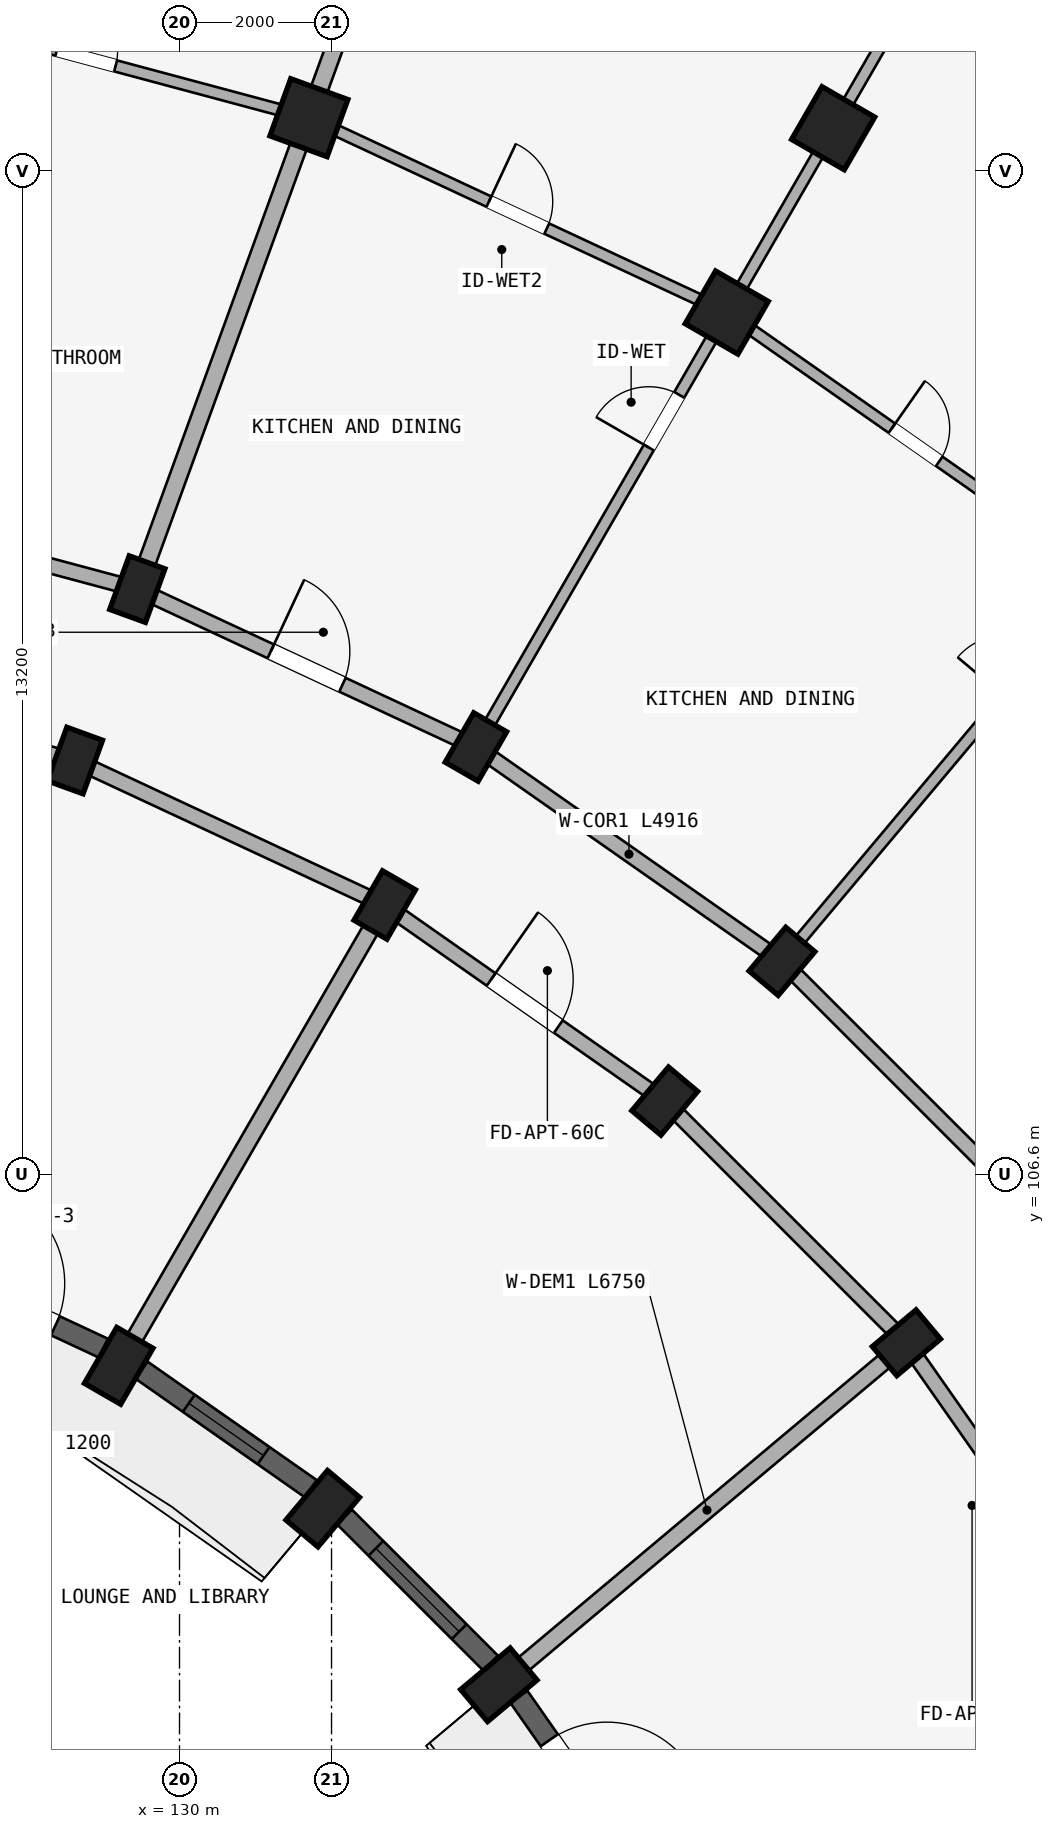
"""IFC4 building model, lengths in metres.
Left out: names, types, materials, properties, quantities, classifications, styles, units other than length and angle.
Written with IfcOpenShell. Run it as: python <this file> out.ifc"""

import sys

from ifc_helpers import new_model, si_unit, direction, frame, frame_2d, origin, origin_2d, place, context, subcontext, project, spatial, rectangle, extrude, element, fill, save


model = new_model("IFC4")
c1 = context("Model", 3, precision=1e-05, world=origin(), true_north=direction((0.0, 1.0)))
c2 = subcontext(c1, "Body", "Model", "MODEL_VIEW")
j1 = project(units=[si_unit("LENGTHUNIT", "METRE"), si_unit("PLANEANGLEUNIT", "RADIAN")], contexts=[c1])
p1 = place(None, origin())
s1 = spatial("IfcSite", under=j1, at=p1, CompositionType="ELEMENT")
p2 = place(p1, origin())
s2 = spatial("IfcBuilding", under=s1, at=p2, CompositionType="ELEMENT")
p3 = place(p2, frame((0.0, 0.0, 8.7)))
s3 = spatial("IfcBuildingStorey", under=s2, at=p3, CompositionType="ELEMENT", Elevation=8.7)
for number, where, z_axis, x_axis in (
    (1, (128.624, 112.044, 0.0), (0.0, 0.0, 1.0), (-0.94, 0.342, 0.0)),
    (2, (129.445, 114.299, 0.0), (0.0, 0.0, 1.0), (-0.94, 0.342, 0.0)),
):
    element("IfcColumn", number, at=place(p3, frame(where, z_axis=z_axis, x_axis=x_axis)), inside=s3, PredefinedType="COLUMN", context=c2, shape_type="SweptSolid", body=[
        extrude(rectangle(XDim=0.5, YDim=0.75, at=origin_2d()), origin(), (0.0, 0.0, 1.0), 2.93),
    ])
p4 = place(p3, frame((131.702, 120.501, 0.0), z_axis=(0.0, 0.0, 1.0), x_axis=(-0.939692620786, 0.342020143326, 0.0)))
e3 = element("IfcColumn", 3, at=p4, inside=s3, PredefinedType="COLUMN", context=c2, shape_type="SweptSolid", body=[
    extrude(rectangle(XDim=0.8, YDim=0.8, at=origin_2d()), origin(), (0.0, 0.0, 1.0), 2.93),
])
p5 = place(p3, frame((129.2, 104.081, 0.0), z_axis=(0.0, 0.0, 1.0), x_axis=(-0.866025403784, 0.5, 0.0)))
e4 = element("IfcColumn", 4, at=p5, inside=s3, PredefinedType="COLUMN", context=c2, shape_type="SweptSolid", body=[
    extrude(rectangle(XDim=0.55, YDim=0.85, at=origin_2d()), origin(), (0.0, 0.0, 1.0), 2.93),
])
for number, where, z_axis, x_axis in (
    (5, (132.7, 110.144, 0.0), (0.0, 0.0, 1.0), (-0.866, 0.5, 0.0)),
    (6, (133.9, 112.222, 0.0), (0.0, 0.0, 1.0), (-0.866, 0.5, 0.0)),
):
    element("IfcColumn", number, at=place(p3, frame(where, z_axis=z_axis, x_axis=x_axis)), inside=s3, PredefinedType="COLUMN", context=c2, shape_type="SweptSolid", body=[
        extrude(rectangle(XDim=0.5, YDim=0.75, at=origin_2d()), origin(), (0.0, 0.0, 1.0), 2.93),
    ])
for number, where, z_axis, x_axis in (
    (7, (137.2, 117.938, 0.0), (0.0, 0.0, 1.0), (-0.866, 0.5, 0.0)),
    (8, (138.6, 120.363, 0.0), (0.0, 0.0, 1.0), (-0.866, 0.5, 0.0)),
):
    element("IfcColumn", number, at=place(p3, frame(where, z_axis=z_axis, x_axis=x_axis)), inside=s3, PredefinedType="COLUMN", context=c2, shape_type="SweptSolid", body=[
        extrude(rectangle(XDim=0.8, YDim=0.8, at=origin_2d()), origin(), (0.0, 0.0, 1.0), 2.93),
    ])
p6 = place(p3, frame((131.885, 102.202, 0.0), z_axis=(0.0, 0.0, 1.0), x_axis=(-0.766044443119, 0.642787609687, 0.0)))
e9 = element("IfcColumn", 9, at=p6, inside=s3, PredefinedType="COLUMN", context=c2, shape_type="SweptSolid", body=[
    extrude(rectangle(XDim=0.55, YDim=0.85, at=origin_2d()), origin(), (0.0, 0.0, 1.0), 2.93),
])
for number, where, z_axis, x_axis in (
    (10, (136.384, 107.564, 0.0), (0.0, 0.0, 1.0), (-0.766, 0.643, 0.0)),
    (11, (137.927, 109.402, 0.0), (0.0, 0.0, 1.0), (-0.766, 0.643, 0.0)),
):
    element("IfcColumn", number, at=place(p3, frame(where, z_axis=z_axis, x_axis=x_axis)), inside=s3, PredefinedType="COLUMN", context=c2, shape_type="SweptSolid", body=[
        extrude(rectangle(XDim=0.5, YDim=0.75, at=origin_2d()), origin(), (0.0, 0.0, 1.0), 2.93),
    ])
p7 = place(p3, frame((134.202, 99.885, 0.0), z_axis=(0.0, 0.0, 1.0), x_axis=(-0.642787609687, 0.766044443119, 0.0)))
e12 = element("IfcColumn", 12, at=p7, inside=s3, PredefinedType="COLUMN", context=c2, shape_type="SweptSolid", body=[
    extrude(rectangle(XDim=0.55, YDim=0.85, at=origin_2d()), origin(), (0.0, 0.0, 1.0), 2.93),
])
p8 = place(p3, frame((139.564, 104.384, 0.0), z_axis=(0.0, 0.0, 1.0), x_axis=(-0.642787609687, 0.766044443119, 0.0)))
e13 = element("IfcColumn", 13, at=p8, inside=s3, PredefinedType="COLUMN", context=c2, shape_type="SweptSolid", body=[
    extrude(rectangle(XDim=0.5, YDim=0.75, at=origin_2d()), origin(), (0.0, 0.0, 1.0), 2.93),
])
p9 = place(p3, frame((124.28, 113.208, 0.0), z_axis=(0.0, 0.0, 1.0), x_axis=(0.965934240054, -0.258787642463, 0.0)))
e14 = element("IfcWall", 14, at=p9, inside=s3, PredefinedType="STANDARD", context=c2, shape_type="SweptSolid", body=[
    extrude(rectangle(XDim=4.497, YDim=0.2, at=frame_2d((2.249, 0.0))), origin(), (0.0, 0.0, 1.0), 2.372),
])
p10 = place(p3, frame((124.697, 115.572, 0.0), z_axis=(0.0, 0.0, 1.0), x_axis=(0.965930095386, -0.258803112091, 0.0)))
e15 = element("IfcWall", 15, at=p10, inside=s3, PredefinedType="STANDARD", context=c2, shape_type="SweptSolid", body=[
    extrude(rectangle(XDim=4.916, YDim=0.2, at=frame_2d((2.458, 0.0))), origin(), (0.0, 0.0, 1.0), 2.372),
])
p11 = place(p3, frame((128.624, 112.044, 0.0), z_axis=(0.0, 0.0, 1.0), x_axis=(0.906307919131, -0.422617978463, 0.0)))
e16 = element("IfcWall", 16, at=p11, inside=s3, PredefinedType="STANDARD", context=c2, shape_type="SweptSolid", body=[
    extrude(rectangle(XDim=4.497, YDim=0.2, at=frame_2d((2.249, 0.0))), origin(), (0.0, 0.0, 1.0), 2.372),
])
p12 = place(p3, frame((129.445, 114.299, 0.0), z_axis=(0.0, 0.0, 1.0), x_axis=(0.906302381024, -0.422629854778, 0.0)))
e17 = element("IfcWall", 17, at=p12, inside=s3, PredefinedType="STANDARD", context=c2, shape_type="SweptSolid", body=[
    extrude(rectangle(XDim=4.915, YDim=0.2, at=frame_2d((2.458, 0.0))), origin(), (0.0, 0.0, 1.0), 2.372),
])
p13 = place(p12, frame((1.938, 0.0, 0.0)))
e18 = element("IfcOpeningElement", 18, at=p13, cuts=e17, PredefinedType="OPENING", context=c2, shape_type="SweptSolid", body=[
    extrude(rectangle(XDim=1.04, YDim=2.15, at=frame_2d((0.52, 1.075))), frame((0.0, 0.11, 0.0), z_axis=(0.0, -1.0, 0.0), x_axis=(1.0, 0.0, 0.0)), (0.0, 0.0, 1.0), 0.22),
])
p14 = place(p3, frame((132.7, 110.144, 0.0), z_axis=(0.0, 0.0, 1.0), x_axis=(0.819155404658, -0.573571637217, 0.0)))
e19 = element("IfcWall", 19, at=p14, inside=s3, PredefinedType="STANDARD", context=c2, shape_type="SweptSolid", body=[
    extrude(rectangle(XDim=4.497, YDim=0.2, at=frame_2d((2.249, 0.0))), origin(), (0.0, 0.0, 1.0), 2.372),
])
p15 = place(p14, frame((1.709, 0.0, 0.0)))
e20 = element("IfcOpeningElement", 20, at=p15, cuts=e19, PredefinedType="OPENING", context=c2, shape_type="SweptSolid", body=[
    extrude(rectangle(XDim=1.08, YDim=2.15, at=frame_2d((0.54, 1.075))), frame((0.0, 0.11, 0.0), z_axis=(0.0, -1.0, 0.0), x_axis=(1.0, 0.0, 0.0)), (0.0, 0.0, 1.0), 0.22),
])
p16 = place(p3, frame((133.9, 112.222, 0.0), z_axis=(0.0, 0.0, 1.0), x_axis=(0.819140911474, -0.573592335331, 0.0)))
e21 = element("IfcWall", 21, at=p16, inside=s3, PredefinedType="STANDARD", context=c2, shape_type="SweptSolid", body=[
    extrude(rectangle(XDim=4.916, YDim=0.2, at=frame_2d((2.458, 0.0))), origin(), (0.0, 0.0, 1.0), 2.372),
])
p17 = place(p3, frame((136.384, 107.564, 0.0), z_axis=(0.0, 0.0, 1.0), x_axis=(0.707106781187, -0.707106781187, 0.0)))
e22 = element("IfcWall", 22, at=p17, inside=s3, PredefinedType="STANDARD", context=c2, shape_type="SweptSolid", body=[
    extrude(rectangle(XDim=4.497, YDim=0.2, at=frame_2d((2.249, 0.0))), origin(), (0.0, 0.0, 1.0), 2.372),
])
p18 = place(p3, frame((137.927, 109.402, 0.0), z_axis=(0.0, 0.0, 1.0), x_axis=(0.707106781187, -0.707106781187, 0.0)))
e23 = element("IfcWall", 23, at=p18, inside=s3, PredefinedType="STANDARD", context=c2, shape_type="SweptSolid", body=[
    extrude(rectangle(XDim=4.916, YDim=0.2, at=frame_2d((2.458, 0.0))), origin(), (0.0, 0.0, 1.0), 2.372),
])
p19 = place(p3, frame((139.564, 104.384, 0.0), z_axis=(0.0, 0.0, 1.0), x_axis=(0.573571637217, -0.819155404658, 0.0)))
e24 = element("IfcWall", 24, at=p19, inside=s3, PredefinedType="STANDARD", context=c2, shape_type="SweptSolid", body=[
    extrude(rectangle(XDim=4.497, YDim=0.2, at=frame_2d((2.249, 0.0))), origin(), (0.0, 0.0, 1.0), 2.372),
])
p20 = place(p19, frame((1.749, 0.0, 0.0)))
e25 = element("IfcOpeningElement", 25, at=p20, cuts=e24, PredefinedType="OPENING", context=c2, shape_type="SweptSolid", body=[
    extrude(rectangle(XDim=1.0, YDim=2.15, at=frame_2d((0.5, 1.075))), frame((0.0, 0.11, 0.0), z_axis=(0.0, -1.0, 0.0), x_axis=(1.0, 0.0, 0.0)), (0.0, 0.0, 1.0), 0.22),
])
p21 = place(p3, frame((129.479, 114.393, 0.0), z_axis=(0.0, 0.0, 1.0), x_axis=(0.342022120477, 0.939691901159, 0.0)))
e26 = element("IfcWall", 26, at=p21, inside=s3, PredefinedType="STANDARD", context=c2, shape_type="SweptSolid", body=[
    extrude(rectangle(XDim=17.42, YDim=0.23, at=frame_2d((8.71, 0.0))), origin(), (0.0, 0.0, 1.0), 2.372),
])
p22 = place(p3, frame((129.3, 104.254, 0.0), z_axis=(0.0, 0.0, 1.0), x_axis=(0.499997969693, 0.866026575979, 0.0)))
e27 = element("IfcWall", 27, at=p22, inside=s3, PredefinedType="STANDARD", context=c2, shape_type="SweptSolid", body=[
    extrude(rectangle(XDim=6.75, YDim=0.22, at=frame_2d((3.375, 0.0))), origin(), (0.0, 0.0, 1.0), 2.372),
])
p23 = place(p3, frame((133.95, 112.309, 0.0), z_axis=(0.0, 0.0, 1.0), x_axis=(0.499997843263, 0.866026648973, 0.0)))
e28 = element("IfcWall", 28, at=p23, inside=s3, PredefinedType="PARTITIONING", context=c2, shape_type="SweptSolid", body=[
    extrude(rectangle(XDim=17.42, YDim=0.15, at=frame_2d((8.71, 0.0))), origin(), (0.0, 0.0, 1.0), 2.372),
])
p24 = place(p23, frame((4.45, 0.0, 0.0)))
e29 = element("IfcOpeningElement", 29, at=p24, cuts=e28, PredefinedType="OPENING", context=c2, shape_type="SweptSolid", body=[
    extrude(rectangle(XDim=0.8, YDim=2.1, at=frame_2d((0.4, 1.05))), frame((0.0, 0.085, 0.0), z_axis=(0.0, -1.0, 0.0), x_axis=(1.0, 0.0, 0.0)), (0.0, 0.0, 1.0), 0.17),
])
p25 = place(p3, frame((137.991, 109.479, 0.0), z_axis=(0.0, 0.0, 1.0), x_axis=(0.642784757967, 0.766046835987, 0.0)))
e30 = element("IfcWall", 30, at=p25, inside=s3, PredefinedType="PARTITIONING", context=c2, shape_type="SweptSolid", body=[
    extrude(rectangle(XDim=17.42, YDim=0.15, at=frame_2d((8.71, 0.0))), origin(), (0.0, 0.0, 1.0), 2.372),
])
p26 = place(p25, frame((4.45, 0.0, 0.0)))
e31 = element("IfcOpeningElement", 31, at=p26, cuts=e30, PredefinedType="OPENING", context=c2, shape_type="SweptSolid", body=[
    extrude(rectangle(XDim=0.8, YDim=2.1, at=frame_2d((0.4, 1.05))), frame((0.0, 0.085, 0.0), z_axis=(0.0, -1.0, 0.0), x_axis=(1.0, 0.0, 0.0)), (0.0, 0.0, 1.0), 0.17),
])
p27 = place(p3, frame((134.355, 100.013, 0.0), z_axis=(0.0, 0.0, 1.0), x_axis=(0.766046761698, 0.642784846501, 0.0)))
e32 = element("IfcWall", 32, at=p27, inside=s3, PredefinedType="STANDARD", context=c2, shape_type="SweptSolid", body=[
    extrude(rectangle(XDim=6.75, YDim=0.22, at=frame_2d((3.375, 0.0))), origin(), (0.0, 0.0, 1.0), 2.372),
])
p28 = place(p3, frame((125.843, 122.071, 0.0), z_axis=(0.0, 0.0, 1.0), x_axis=(0.965923618901, -0.258827283048, 0.0)))
e33 = element("IfcWall", 33, at=p28, inside=s3, PredefinedType="PLUMBINGWALL", context=c2, shape_type="SweptSolid", body=[
    extrude(rectangle(XDim=6.066, YDim=0.15, at=frame_2d((3.033, 0.0))), origin(), (0.0, 0.0, 1.0), 2.372),
])
p29 = place(p28, frame((2.633, 0.0, 0.0)))
e34 = element("IfcOpeningElement", 34, at=p29, cuts=e33, PredefinedType="OPENING", context=c2, shape_type="SweptSolid", body=[
    extrude(rectangle(XDim=0.8, YDim=2.1, at=frame_2d((0.4, 1.05))), frame((0.0, 0.085, 0.0), z_axis=(0.0, -1.0, 0.0), x_axis=(1.0, 0.0, 0.0)), (0.0, 0.0, 1.0), 0.17),
])
p30 = place(p3, frame((131.702, 120.501, 0.0), z_axis=(0.0, 0.0, 1.0), x_axis=(0.906312656069, -0.42260781991, 0.0)))
e35 = element("IfcWall", 35, at=p30, inside=s3, PredefinedType="PLUMBINGWALL", context=c2, shape_type="SweptSolid", body=[
    extrude(rectangle(XDim=6.066, YDim=0.15, at=frame_2d((3.033, 0.0))), origin(), (0.0, 0.0, 1.0), 2.372),
])
p31 = place(p30, frame((2.613, 0.0, 0.0)))
e36 = element("IfcOpeningElement", 36, at=p31, cuts=e35, PredefinedType="OPENING", context=c2, shape_type="SweptSolid", body=[
    extrude(rectangle(XDim=0.84, YDim=2.1, at=frame_2d((0.42, 1.05))), frame((0.0, 0.085, 0.0), z_axis=(0.0, -1.0, 0.0), x_axis=(1.0, 0.0, 0.0)), (0.0, 0.0, 1.0), 0.17),
])
p32 = place(p3, frame((137.2, 117.938, 0.0), z_axis=(0.0, 0.0, 1.0), x_axis=(0.81913926159, -0.573594691504, 0.0)))
e37 = element("IfcWall", 37, at=p32, inside=s3, PredefinedType="PLUMBINGWALL", context=c2, shape_type="SweptSolid", body=[
    extrude(rectangle(XDim=6.066, YDim=0.15, at=frame_2d((3.033, 0.0))), origin(), (0.0, 0.0, 1.0), 2.372),
])
p33 = place(p32, frame((2.653, 0.0, 0.0)))
e38 = element("IfcOpeningElement", 38, at=p33, cuts=e37, PredefinedType="OPENING", context=c2, shape_type="SweptSolid", body=[
    extrude(rectangle(XDim=0.76, YDim=2.05, at=frame_2d((0.38, 1.025))), frame((0.0, 0.085, 0.0), z_axis=(0.0, -1.0, 0.0), x_axis=(1.0, 0.0, 0.0)), (0.0, 0.0, 1.0), 0.17),
])
p34 = place(p3, frame((126.536, 105.461, 0.0), z_axis=(0.0, 0.0, 1.0), x_axis=(0.906311629168, -0.422610022166, 0.0)))
e39 = element("IfcWall", 39, at=p34, inside=s3, PredefinedType="STANDARD", context=c2, shape_type="SweptSolid", body=[
    extrude(rectangle(XDim=2.718, YDim=0.275, at=frame_2d((1.359, 0.0))), origin(), (0.0, 0.0, 1.0), 2.472),
])
p35 = place(p34, frame((0.699, 0.0, 0.0)))
e40 = element("IfcOpeningElement", 40, at=p35, cuts=e39, PredefinedType="OPENING", context=c2, shape_type="SweptSolid", body=[
    extrude(rectangle(XDim=1.32, YDim=2.15, at=frame_2d((0.66, 1.075))), frame((0.0, 0.147, 0.0), z_axis=(0.0, -1.0, 0.0), x_axis=(1.0, 0.0, 0.0)), (0.0, 0.0, 1.0), 0.295),
])
p36 = place(p3, frame((129.501, 104.023, 0.0), z_axis=(0.0, 0.0, 1.0), x_axis=(0.81917282593, -0.573546755948, 0.0)))
e41 = element("IfcWall", 41, at=p36, inside=s3, PredefinedType="STANDARD", context=c2, shape_type="SweptSolid", body=[
    extrude(rectangle(XDim=2.718, YDim=0.275, at=frame_2d((1.359, 0.0))), origin(), (0.0, 0.0, 1.0), 2.472),
])
p37 = place(p36, frame((0.759, 0.0, 0.772)))
e42 = element("IfcOpeningElement", 42, at=p37, cuts=e41, PredefinedType="OPENING", context=c2, shape_type="SweptSolid", body=[
    extrude(rectangle(XDim=1.2, YDim=1.5, at=frame_2d((0.6, 0.75))), frame((0.0, 0.147, 0.0), z_axis=(0.0, -1.0, 0.0), x_axis=(1.0, 0.0, 0.0)), (0.0, 0.0, 1.0), 0.295),
])
p38 = place(p3, frame((132.171, 102.092, 0.0), z_axis=(0.0, 0.0, 1.0), x_axis=(0.707106781187, -0.707106781187, 0.0)))
e43 = element("IfcWall", 43, at=p38, inside=s3, PredefinedType="STANDARD", context=c2, shape_type="SweptSolid", body=[
    extrude(rectangle(XDim=2.718, YDim=0.275, at=frame_2d((1.359, 0.0))), origin(), (0.0, 0.0, 1.0), 2.472),
])
p39 = place(p38, frame((0.584, 0.0, 0.672)))
e44 = element("IfcOpeningElement", 44, at=p39, cuts=e43, PredefinedType="OPENING", context=c2, shape_type="SweptSolid", body=[
    extrude(rectangle(XDim=1.55, YDim=1.6, at=frame_2d((0.775, 0.8))), frame((0.0, 0.147, 0.0), z_axis=(0.0, -1.0, 0.0), x_axis=(1.0, 0.0, 0.0)), (0.0, 0.0, 1.0), 0.295),
])
p40 = place(p3, frame((134.465, 99.727, 0.0), z_axis=(0.0, 0.0, 1.0), x_axis=(0.573546755948, -0.81917282593, 0.0)))
e45 = element("IfcWall", 45, at=p40, inside=s3, PredefinedType="STANDARD", context=c2, shape_type="SweptSolid", body=[
    extrude(rectangle(XDim=2.718, YDim=0.275, at=frame_2d((1.359, 0.0))), origin(), (0.0, 0.0, 1.0), 2.472),
])
p41 = place(p40, frame((0.699, 0.0, 0.0)))
e46 = element("IfcOpeningElement", 46, at=p41, cuts=e45, PredefinedType="OPENING", context=c2, shape_type="SweptSolid", body=[
    extrude(rectangle(XDim=1.32, YDim=2.15, at=frame_2d((0.66, 1.075))), frame((0.0, 0.147, 0.0), z_axis=(0.0, -1.0, 0.0), x_axis=(1.0, 0.0, 0.0)), (0.0, 0.0, 1.0), 0.295),
])
p42 = place(p37, origin())
e47 = element("IfcWindow", 47, at=p42, inside=s3, PartitioningType="SINGLE_PANEL", PredefinedType="WINDOW", context=c2, shape_type="SweptSolid", body=[
    extrude(rectangle(XDim=1.2, YDim=1.5, at=frame_2d((0.6, 0.75))), frame((0.0, 0.03, 0.0), z_axis=(0.0, -1.0, 0.0), x_axis=(1.0, 0.0, 0.0)), (0.0, 0.0, 1.0), 0.06),
])
fill(e42, e47)
p43 = place(p39, origin())
e48 = element("IfcWindow", 48, at=p43, inside=s3, PartitioningType="DOUBLE_PANEL_VERTICAL", PredefinedType="WINDOW", context=c2, shape_type="SweptSolid", body=[
    extrude(rectangle(XDim=1.55, YDim=1.6, at=frame_2d((0.775, 0.8))), frame((0.0, 0.03, 0.0), z_axis=(0.0, -1.0, 0.0), x_axis=(1.0, 0.0, 0.0)), (0.0, 0.0, 1.0), 0.06),
])
fill(e44, e48)
p44 = place(p24, frame((0.8, 0.0, 0.0), z_axis=(0.0, 0.0, 1.0), x_axis=(-1.0, 0.0, 0.0)))
e49 = element("IfcDoor", 49, at=p44, inside=s3, OperationType="SINGLE_SWING_RIGHT", PredefinedType="DOOR", context=c2, shape_type="SweptSolid", body=[
    extrude(rectangle(XDim=0.8, YDim=2.1, at=frame_2d((0.4, 1.05))), frame((0.0, 0.025, 0.0), z_axis=(0.0, -1.0, 0.0), x_axis=(1.0, 0.0, 0.0)), (0.0, 0.0, 1.0), 0.05),
])
fill(e29, e49)
p45 = place(p29, origin())
e50 = element("IfcDoor", 50, at=p45, inside=s3, OperationType="SINGLE_SWING_LEFT", PredefinedType="DOOR", context=c2, shape_type="SweptSolid", body=[
    extrude(rectangle(XDim=0.8, YDim=2.1, at=frame_2d((0.4, 1.05))), frame((0.0, 0.025, 0.0), z_axis=(0.0, -1.0, 0.0), x_axis=(1.0, 0.0, 0.0)), (0.0, 0.0, 1.0), 0.05),
])
fill(e34, e50)
p46 = place(p13, frame((1.04, 0.0, 0.0), z_axis=(0.0, 0.0, 1.0), x_axis=(-1.0, 0.0, 0.0)))
e51 = element("IfcDoor", 51, at=p46, inside=s3, OperationType="SINGLE_SWING_RIGHT", PredefinedType="DOOR", context=c2, shape_type="SweptSolid", body=[
    extrude(rectangle(XDim=1.04, YDim=2.15, at=frame_2d((0.52, 1.075))), frame((0.0, 0.025, 0.0), z_axis=(0.0, -1.0, 0.0), x_axis=(1.0, 0.0, 0.0)), (0.0, 0.0, 1.0), 0.05),
])
fill(e18, e51)
p47 = place(p31, origin())
e52 = element("IfcDoor", 52, at=p47, inside=s3, OperationType="SINGLE_SWING_LEFT", PredefinedType="DOOR", context=c2, shape_type="SweptSolid", body=[
    extrude(rectangle(XDim=0.84, YDim=2.1, at=frame_2d((0.42, 1.05))), frame((0.0, 0.025, 0.0), z_axis=(0.0, -1.0, 0.0), x_axis=(1.0, 0.0, 0.0)), (0.0, 0.0, 1.0), 0.05),
])
fill(e36, e52)
p48 = place(p33, frame((0.76, 0.0, 0.0), z_axis=(0.0, 0.0, 1.0), x_axis=(-1.0, 0.0, 0.0)))
e53 = element("IfcDoor", 53, at=p48, inside=s3, OperationType="SINGLE_SWING_RIGHT", PredefinedType="DOOR", context=c2, shape_type="SweptSolid", body=[
    extrude(rectangle(XDim=0.76, YDim=2.05, at=frame_2d((0.38, 1.025))), frame((0.0, 0.025, 0.0), z_axis=(0.0, -1.0, 0.0), x_axis=(1.0, 0.0, 0.0)), (0.0, 0.0, 1.0), 0.05),
])
fill(e38, e53)
p49 = place(p15, frame((1.08, 0.0, 0.0), z_axis=(0.0, 0.0, 1.0), x_axis=(-1.0, 0.0, 0.0)))
e54 = element("IfcDoor", 54, at=p49, inside=s3, OperationType="SINGLE_SWING_RIGHT", PredefinedType="DOOR", context=c2, shape_type="SweptSolid", body=[
    extrude(rectangle(XDim=1.08, YDim=2.15, at=frame_2d((0.54, 1.075))), frame((0.0, 0.025, 0.0), z_axis=(0.0, -1.0, 0.0), x_axis=(1.0, 0.0, 0.0)), (0.0, 0.0, 1.0), 0.05),
])
fill(e20, e54)
p50 = place(p35, frame((1.32, 0.0, 0.0), z_axis=(0.0, 0.0, 1.0), x_axis=(-1.0, 0.0, 0.0)))
e55 = element("IfcDoor", 55, at=p50, inside=s3, OperationType="SINGLE_SWING_RIGHT", PredefinedType="DOOR", context=c2, shape_type="SweptSolid", body=[
    extrude(rectangle(XDim=1.32, YDim=2.15, at=frame_2d((0.66, 1.075))), frame((0.0, 0.025, 0.0), z_axis=(0.0, -1.0, 0.0), x_axis=(1.0, 0.0, 0.0)), (0.0, 0.0, 1.0), 0.05),
])
fill(e40, e55)
p51 = place(p41, frame((1.32, 0.0, 0.0), z_axis=(0.0, 0.0, 1.0), x_axis=(-1.0, 0.0, 0.0)))
e56 = element("IfcDoor", 56, at=p51, inside=s3, OperationType="SINGLE_SWING_LEFT", PredefinedType="DOOR", context=c2, shape_type="SweptSolid", body=[
    extrude(rectangle(XDim=1.32, YDim=2.15, at=frame_2d((0.66, 1.075))), frame((0.0, 0.025, 0.0), z_axis=(0.0, -1.0, 0.0), x_axis=(1.0, 0.0, 0.0)), (0.0, 0.0, 1.0), 0.05),
])
fill(e46, e56)
save(model, sys.argv[1])
